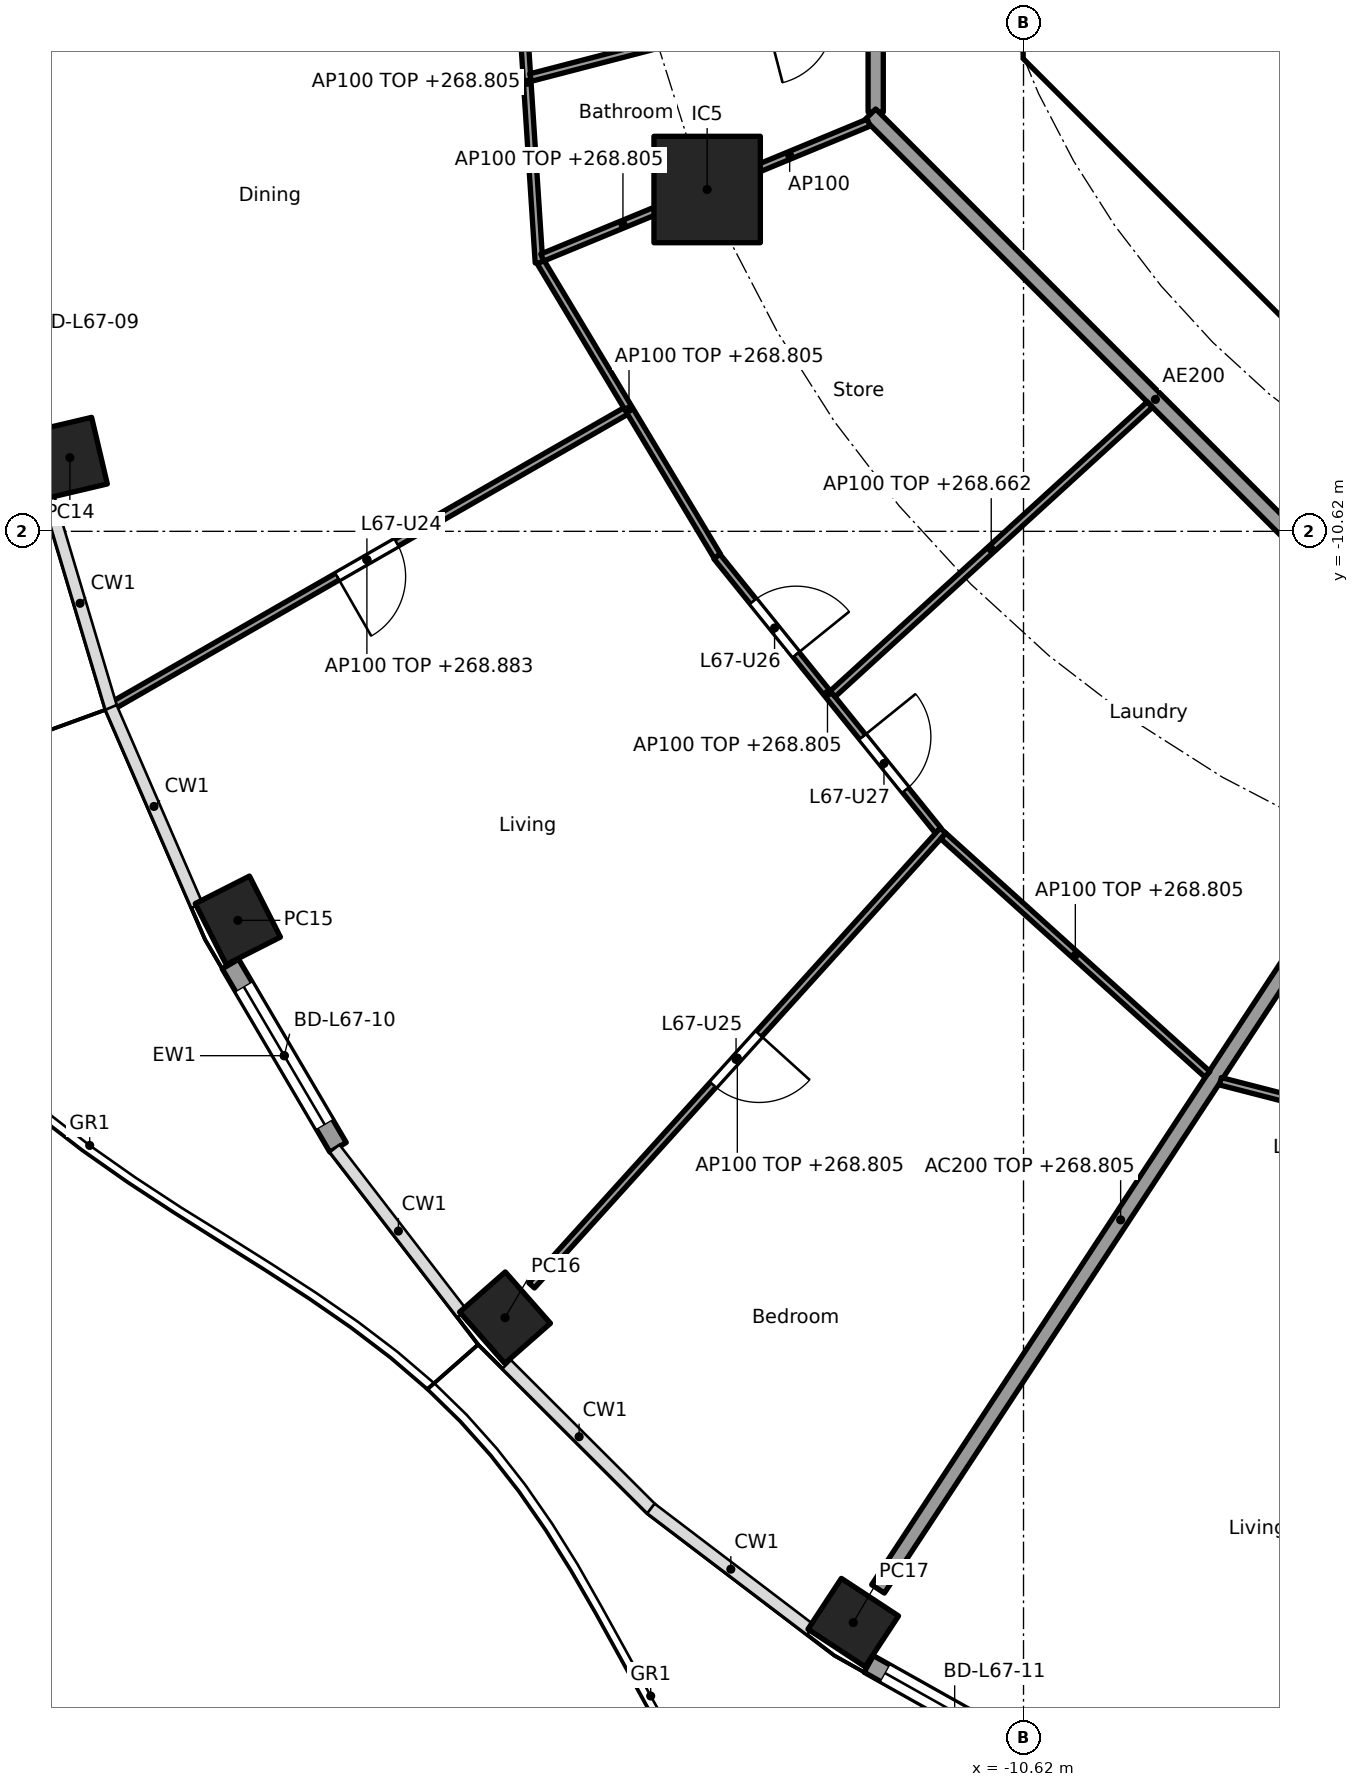
"""IFC4 building model, lengths in metres.
Left out: names, types, materials, properties, quantities, classifications, styles, units other than length and angle.
Written with IfcOpenShell. Run it as: python <this file> out.ifc"""

import sys

from ifc_helpers import new_model, si_unit, direction, frame, frame_2d, origin, origin_2d, place, context, subcontext, project, spatial, polyline, rectangle, hollow_rectangle, outline, extrude, element, fill, save


model = new_model("IFC4")
c1 = context("Model", 3, precision=1e-05, world=origin(), true_north=direction((0.0, 1.0)))
c2 = subcontext(c1, "Body", "Model", "MODEL_VIEW")
j1 = project(units=[si_unit("LENGTHUNIT", "METRE"), si_unit("PLANEANGLEUNIT", "RADIAN")], contexts=[c1])
p1 = place(None, origin())
s1 = spatial("IfcSite", under=j1, at=p1, CompositionType="ELEMENT")
p2 = place(p1, origin())
s2 = spatial("IfcBuilding", under=s1, at=p2, CompositionType="ELEMENT")
p3 = place(p2, frame((0.0, 0.0, 265.9)))
s3 = spatial("IfcBuildingStorey", under=s2, at=p3, CompositionType="ELEMENT", Elevation=265.9)
for number, where, z_axis, x_axis in (
    (1, (-23.166, -9.65, 0.0), (0.0, 0.0, 1.0), (0.229, -0.973, 0.0)),
    (2, (-20.957, -15.738, 0.0), (0.0, 0.0, 1.0), (0.452, -0.892, 0.0)),
    (3, (-17.441, -20.965, 0.0), (0.0, 0.0, 1.0), (0.66, -0.751, 0.0)),
    (4, (-12.86, -24.976, 0.0), (0.0, 0.0, 1.0), (0.836, -0.549, 0.0)),
):
    element("IfcColumn", number, at=place(p3, frame(where, z_axis=z_axis, x_axis=x_axis)), inside=s3, PredefinedType="COLUMN", context=c2, shape_type="SweptSolid", body=[
        extrude(hollow_rectangle(XDim=0.9, YDim=0.8, WallThickness=0.028, at=origin_2d()), origin(), (0.0, 0.0, 1.0), 3.7),
    ])
p4 = place(p3, frame((-14.782, -6.123, 0.0), z_axis=(0.0, 0.0, 1.0), x_axis=(1.0, 0.0, 0.0)))
e5 = element("IfcColumn", 5, at=p4, inside=s3, PredefinedType="COLUMN", context=c2, shape_type="SweptSolid", body=[
    extrude(rectangle(XDim=1.4, YDim=1.4, at=origin_2d()), origin(), (0.0, 0.0, 1.0), 3.7),
])
p5 = place(p3, frame((-19.638, -18.724, 0.0), z_axis=(0.0, 0.0, 1.0), x_axis=(-0.506371364425, 0.862315511452, 0.0)))
e6 = element("IfcWall", 6, at=p5, inside=s3, PredefinedType="SOLIDWALL", context=c2, shape_type="SweptSolid", body=[
    extrude(rectangle(XDim=2.796, YDim=0.25, at=frame_2d((1.398, 0.0))), origin(), (0.0, 0.0, 1.0), 3.44),
])
p6 = place(p5, frame((0.348, 0.0, 0.0)))
e7 = element("IfcOpeningElement", 7, at=p6, cuts=e6, PredefinedType="OPENING", context=c2, shape_type="SweptSolid", body=[
    extrude(rectangle(XDim=2.1, YDim=2.4, at=frame_2d((1.05, 1.2))), frame((0.0, 0.135, 0.0), z_axis=(0.0, -1.0, 0.0), x_axis=(1.0, 0.0, 0.0)), (0.0, 0.0, 1.0), 0.27),
])
p7 = place(p3, frame((-10.395, -26.789, 0.0), z_axis=(0.0, 0.0, 1.0), x_axis=(-0.872115604046, 0.489299880625, 0.0)))
e8 = element("IfcWall", 8, at=p7, inside=s3, PredefinedType="SOLIDWALL", context=c2, shape_type="SweptSolid", body=[
    extrude(rectangle(XDim=2.593, YDim=0.25, at=frame_2d((1.296, 0.0))), origin(), (0.0, 0.0, 1.0), 3.44),
])
p8 = place(p7, frame((0.247, 0.0, 0.0)))
e9 = element("IfcOpeningElement", 9, at=p8, cuts=e8, PredefinedType="OPENING", context=c2, shape_type="SweptSolid", body=[
    extrude(rectangle(XDim=2.1, YDim=2.4, at=frame_2d((1.05, 1.2))), frame((0.0, 0.135, 0.0), z_axis=(0.0, -1.0, 0.0), x_axis=(1.0, 0.0, 0.0)), (0.0, 0.0, 1.0), 0.27),
])
p9 = place(p3, frame((-9.988, -4.613, 0.0), z_axis=(0.0, 0.0, 1.0), x_axis=(0.707106781187, -0.707106781187, 0.0)))
e10 = element("IfcWall", 10, at=p9, inside=s3, PredefinedType="SHEAR", context=c2, shape_type="SweptSolid", body=[
    extrude(rectangle(XDim=7.602, YDim=0.6, at=frame_2d((3.801, 0.0))), origin(), (0.0, 0.0, 1.0), 3.44),
])
p10 = place(p9, frame((6.151, 0.0, 0.0)))
e11 = element("IfcOpeningElement", 11, at=p10, cuts=e10, PredefinedType="OPENING", context=c2, shape_type="SweptSolid", body=[
    extrude(rectangle(XDim=1.1, YDim=2.1, at=frame_2d((0.55, 1.05))), frame((0.0, 0.31, 0.0), z_axis=(0.0, -1.0, 0.0), x_axis=(1.0, 0.0, 0.0)), (0.0, 0.0, 1.0), 0.62),
])
p11 = place(p3, origin())
e12 = element("IfcWall", 12, at=p11, inside=s3, PredefinedType="SHEAR", context=c2, shape_type="SweptSolid", body=[
    extrude(outline(polyline([(-10.625, -3.801), (-10.025, -3.801), (-10.025, -4.152), (-9.776, -4.401), (-10.2, -4.825), (-10.625, -4.401), (-10.625, -3.801)])), origin(), (0.0, 0.0, 1.0), 3.44),
])
p12 = place(p3, frame((-8.001, -6.1, 0.0), z_axis=(0.0, 0.0, 1.0), x_axis=(1.0, 0.0, 0.0)))
e13 = element("IfcWall", 13, at=p12, inside=s3, PredefinedType="PARTITIONING", context=c2, shape_type="SweptSolid", body=[
    extrude(rectangle(XDim=2.126, YDim=0.15, at=frame_2d((1.063, 0.0))), origin(), (0.0, 0.0, 1.0), 3.44),
])
p13 = place(p3, frame((-6.151, -14.824, 0.0), z_axis=(0.0, 0.0, 1.0), x_axis=(-0.549345577828, -0.835595258556, 0.0)))
e14 = element("IfcWall", 14, at=p13, inside=s3, PredefinedType="PARTITIONING", context=c2, shape_type="SweptSolid", body=[
    extrude(rectangle(XDim=11.62, YDim=0.2, at=frame_2d((5.81, 0.0))), origin(), (0.0, 0.0, 1.0), 2.905),
])
p14 = place(p3, frame((-12.565, 5.304, 0.0), z_axis=(0.0, 0.0, 1.0), x_axis=(0.0, -1.0, 0.0)))
e15 = element("IfcWall", 15, at=p14, inside=s3, PredefinedType="PARTITIONING", context=c2, shape_type="SweptSolid", body=[
    extrude(rectangle(XDim=10.409, YDim=0.2, at=frame_2d((5.205, 0.0))), origin(), (0.0, 0.0, 1.0), 3.44),
])
p15 = place(p14, frame((6.539, 0.0, 0.0)))
e16 = element("IfcOpeningElement", 16, at=p15, cuts=e15, PredefinedType="OPENING", context=c2, shape_type="SweptSolid", body=[
    extrude(rectangle(XDim=1.0, YDim=2.1, at=frame_2d((0.5, 1.05))), frame((0.0, 0.11, 0.0), z_axis=(0.0, -1.0, 0.0), x_axis=(1.0, 0.0, 0.0)), (0.0, 0.0, 1.0), 0.22),
])
p16 = place(p3, frame((-12.635, -5.134, 0.0), z_axis=(0.0, 0.0, 1.0), x_axis=(0.707106781187, -0.707106781187, 0.0)))
e17 = element("IfcWall", 17, at=p16, inside=s3, PredefinedType="PARTITIONING", context=c2, shape_type="SweptSolid", body=[
    extrude(rectangle(XDim=10.609, YDim=0.2, at=frame_2d((5.305, 0.0))), origin(), (0.0, 0.0, 1.0), 3.44),
])
p17 = place(p3, frame((-17.304, -2.338, 0.0), z_axis=(0.0, 0.0, 1.0), x_axis=(0.065003615989, -0.997885028402, 0.0)))
e18 = element("IfcWall", 18, at=p17, inside=s3, PredefinedType="PARTITIONING", context=c2, shape_type="SweptSolid", body=[
    extrude(rectangle(XDim=4.759, YDim=0.1, at=frame_2d((2.379, 0.0))), origin(), (0.0, 0.0, 1.0), 2.905),
])
p18 = place(p3, frame((-12.662, -3.495, 0.0), z_axis=(0.0, 0.0, 1.0), x_axis=(-0.967834941053, -0.251586022817, 0.0)))
e19 = element("IfcWall", 19, at=p18, inside=s3, PredefinedType="PARTITIONING", context=c2, shape_type="SweptSolid", body=[
    extrude(rectangle(XDim=4.59, YDim=0.1, at=frame_2d((2.295, 0.0))), origin(), (0.0, 0.0, 1.0), 2.762),
])
p19 = place(p18, frame((0.5, 0.0, 0.0)))
e20 = element("IfcOpeningElement", 20, at=p19, cuts=e19, PredefinedType="OPENING", context=c2, shape_type="SweptSolid", body=[
    extrude(rectangle(XDim=0.9, YDim=2.1, at=frame_2d((0.45, 1.05))), frame((0.0, 0.06, 0.0), z_axis=(0.0, -1.0, 0.0), x_axis=(1.0, 0.0, 0.0)), (0.0, 0.0, 1.0), 0.12),
])
p20 = place(p3, frame((-12.657, -5.243, 0.0), z_axis=(0.0, 0.0, 1.0), x_axis=(-0.923864733477, -0.382719158442, 0.0)))
e21 = element("IfcWall", 21, at=p20, inside=s3, PredefinedType="PARTITIONING", context=c2, shape_type="SweptSolid", body=[
    extrude(rectangle(XDim=2.25, YDim=0.1, at=frame_2d((1.125, 0.0))), origin(), (0.0, 0.0, 1.0), 3.44),
])
p21 = place(p3, frame((-14.828, -6.142, 0.0), z_axis=(0.0, 0.0, 1.0), x_axis=(-0.924479819749, -0.381230983627, 0.0)))
e22 = element("IfcWall", 22, at=p21, inside=s3, PredefinedType="PARTITIONING", context=c2, shape_type="SweptSolid", body=[
    extrude(rectangle(XDim=2.296, YDim=0.1, at=frame_2d((1.148, 0.0))), origin(), (0.0, 0.0, 1.0), 2.905),
])
p22 = place(p3, frame((-16.972, -7.08, 0.0), z_axis=(0.0, 0.0, 1.0), x_axis=(0.514989049311, -0.857196756346, 0.0)))
e23 = element("IfcWall", 23, at=p22, inside=s3, PredefinedType="PARTITIONING", context=c2, shape_type="SweptSolid", body=[
    extrude(rectangle(XDim=4.512, YDim=0.1, at=frame_2d((2.256, 0.0))), origin(), (0.0, 0.0, 1.0), 2.905),
])
p23 = place(p3, frame((-15.854, -9.038, 0.0), z_axis=(0.0, 0.0, 1.0), x_axis=(-0.867229230904, -0.497909089157, 0.0)))
e24 = element("IfcWall", 24, at=p23, inside=s3, PredefinedType="PARTITIONING", context=c2, shape_type="SweptSolid", body=[
    extrude(rectangle(XDim=7.853, YDim=0.1, at=frame_2d((3.926, 0.0))), origin(), (0.0, 0.0, 1.0), 2.983),
])
p24 = place(p23, frame((3.476, 0.0, 0.0)))
e25 = element("IfcOpeningElement", 25, at=p24, cuts=e24, PredefinedType="OPENING", context=c2, shape_type="SweptSolid", body=[
    extrude(rectangle(XDim=0.9, YDim=2.1, at=frame_2d((0.45, 1.05))), frame((0.0, 0.06, 0.0), z_axis=(0.0, -1.0, 0.0), x_axis=(1.0, 0.0, 0.0)), (0.0, 0.0, 1.0), 0.12),
])
p25 = place(p3, frame((-14.654, -10.951, 0.0), z_axis=(0.0, 0.0, 1.0), x_axis=(0.62815308134, -0.778089780426, 0.0)))
e26 = element("IfcWall", 26, at=p25, inside=s3, PredefinedType="PARTITIONING", context=c2, shape_type="SweptSolid", body=[
    extrude(rectangle(XDim=4.633, YDim=0.1, at=frame_2d((2.316, 0.0))), origin(), (0.0, 0.0, 1.0), 2.905),
])
p26 = place(p25, frame((0.758, 0.0, 0.0)))
e27 = element("IfcOpeningElement", 27, at=p26, cuts=e26, PredefinedType="OPENING", context=c2, shape_type="SweptSolid", body=[
    extrude(rectangle(XDim=0.9, YDim=2.1, at=frame_2d((0.45, 1.05))), frame((0.0, 0.06, 0.0), z_axis=(0.0, -1.0, 0.0), x_axis=(1.0, 0.0, 0.0)), (0.0, 0.0, 1.0), 0.12),
])
p27 = place(p25, frame((3.049, 0.0, 0.0)))
e28 = element("IfcOpeningElement", 28, at=p27, cuts=e26, PredefinedType="OPENING", context=c2, shape_type="SweptSolid", body=[
    extrude(rectangle(XDim=0.9, YDim=2.1, at=frame_2d((0.45, 1.05))), frame((0.0, 0.06, 0.0), z_axis=(0.0, -1.0, 0.0), x_axis=(1.0, 0.0, 0.0)), (0.0, 0.0, 1.0), 0.12),
])
p28 = place(p3, frame((-8.958, -8.952, 0.0), z_axis=(0.0, 0.0, 1.0), x_axis=(-0.73876526954, -0.673962815385, 0.0)))
e29 = element("IfcWall", 29, at=p28, inside=s3, PredefinedType="PARTITIONING", context=c2, shape_type="SweptSolid", body=[
    extrude(rectangle(XDim=5.647, YDim=0.1, at=frame_2d((2.824, 0.0))), origin(), (0.0, 0.0, 1.0), 2.762),
])
p29 = place(p3, frame((-11.679, -14.557, 0.0), z_axis=(0.0, 0.0, 1.0), x_axis=(-0.670800011545, -0.741638284146, 0.0)))
e30 = element("IfcWall", 30, at=p29, inside=s3, PredefinedType="PARTITIONING", context=c2, shape_type="SweptSolid", body=[
    extrude(rectangle(XDim=8.068, YDim=0.1, at=frame_2d((4.034, 0.0))), origin(), (0.0, 0.0, 1.0), 2.905),
])
p30 = place(p29, frame((3.609, 0.0, 0.0)))
e31 = element("IfcOpeningElement", 31, at=p30, cuts=e30, PredefinedType="OPENING", context=c2, shape_type="SweptSolid", body=[
    extrude(rectangle(XDim=0.9, YDim=2.1, at=frame_2d((0.45, 1.05))), frame((0.0, 0.06, 0.0), z_axis=(0.0, -1.0, 0.0), x_axis=(1.0, 0.0, 0.0)), (0.0, 0.0, 1.0), 0.12),
])
p31 = place(p3, frame((-11.676, -14.628, 0.0), z_axis=(0.0, 0.0, 1.0), x_axis=(0.74245829867, -0.669892285921, 0.0)))
e32 = element("IfcWall", 32, at=p31, inside=s3, PredefinedType="PARTITIONING", context=c2, shape_type="SweptSolid", body=[
    extrude(rectangle(XDim=4.68, YDim=0.1, at=frame_2d((2.34, 0.0))), origin(), (0.0, 0.0, 1.0), 2.905),
])
p32 = place(p3, frame((-8.03, -17.854, 0.0), z_axis=(0.0, 0.0, 1.0), x_axis=(0.968441967324, -0.249239154077, 0.0)))
e33 = element("IfcWall", 33, at=p32, inside=s3, PredefinedType="PARTITIONING", context=c2, shape_type="SweptSolid", body=[
    extrude(rectangle(XDim=3.468, YDim=0.1, at=frame_2d((1.734, 0.0))), origin(), (0.0, 0.0, 1.0), 2.905),
])
p33 = place(p32, frame((1.284, 0.0, 0.0)))
e34 = element("IfcOpeningElement", 34, at=p33, cuts=e33, PredefinedType="OPENING", context=c2, shape_type="SweptSolid", body=[
    extrude(rectangle(XDim=0.9, YDim=2.1, at=frame_2d((0.45, 1.05))), frame((0.0, 0.06, 0.0), z_axis=(0.0, -1.0, 0.0), x_axis=(1.0, 0.0, 0.0)), (0.0, 0.0, 1.0), 0.12),
])
p34 = place(p6, origin())
e35 = element("IfcDoor", 35, at=p34, inside=s3, OperationType="SLIDING_TO_LEFT", PredefinedType="DOOR", context=c2, shape_type="SweptSolid", body=[
    extrude(rectangle(XDim=2.1, YDim=2.4, at=frame_2d((1.05, 1.2))), frame((0.0, 0.025, 0.0), z_axis=(0.0, -1.0, 0.0), x_axis=(1.0, 0.0, 0.0)), (0.0, 0.0, 1.0), 0.05),
])
fill(e7, e35)
p35 = place(p8, origin())
e36 = element("IfcDoor", 36, at=p35, inside=s3, OperationType="SLIDING_TO_LEFT", PredefinedType="DOOR", context=c2, shape_type="SweptSolid", body=[
    extrude(rectangle(XDim=2.1, YDim=2.4, at=frame_2d((1.05, 1.2))), frame((0.0, 0.025, 0.0), z_axis=(0.0, -1.0, 0.0), x_axis=(1.0, 0.0, 0.0)), (0.0, 0.0, 1.0), 0.05),
])
fill(e9, e36)
p36 = place(p24, origin())
e37 = element("IfcDoor", 37, at=p36, inside=s3, OperationType="SINGLE_SWING_RIGHT", PredefinedType="DOOR", context=c2, shape_type="SweptSolid", body=[
    extrude(rectangle(XDim=0.9, YDim=2.1, at=frame_2d((0.45, 1.05))), frame((0.0, 0.025, 0.0), z_axis=(0.0, -1.0, 0.0), x_axis=(1.0, 0.0, 0.0)), (0.0, 0.0, 1.0), 0.05),
])
fill(e25, e37)
p37 = place(p30, origin())
e38 = element("IfcDoor", 38, at=p37, inside=s3, OperationType="SINGLE_SWING_LEFT", PredefinedType="DOOR", context=c2, shape_type="SweptSolid", body=[
    extrude(rectangle(XDim=0.9, YDim=2.1, at=frame_2d((0.45, 1.05))), frame((0.0, 0.025, 0.0), z_axis=(0.0, -1.0, 0.0), x_axis=(1.0, 0.0, 0.0)), (0.0, 0.0, 1.0), 0.05),
])
fill(e31, e38)
p38 = place(p26, origin())
e39 = element("IfcDoor", 39, at=p38, inside=s3, OperationType="SINGLE_SWING_RIGHT", PredefinedType="DOOR", context=c2, shape_type="SweptSolid", body=[
    extrude(rectangle(XDim=0.9, YDim=2.1, at=frame_2d((0.45, 1.05))), frame((0.0, 0.025, 0.0), z_axis=(0.0, -1.0, 0.0), x_axis=(1.0, 0.0, 0.0)), (0.0, 0.0, 1.0), 0.05),
])
fill(e27, e39)
p39 = place(p27, origin())
e40 = element("IfcDoor", 40, at=p39, inside=s3, OperationType="SINGLE_SWING_LEFT", PredefinedType="DOOR", context=c2, shape_type="SweptSolid", body=[
    extrude(rectangle(XDim=0.9, YDim=2.1, at=frame_2d((0.45, 1.05))), frame((0.0, 0.025, 0.0), z_axis=(0.0, -1.0, 0.0), x_axis=(1.0, 0.0, 0.0)), (0.0, 0.0, 1.0), 0.05),
])
fill(e28, e40)
save(model, sys.argv[1])
